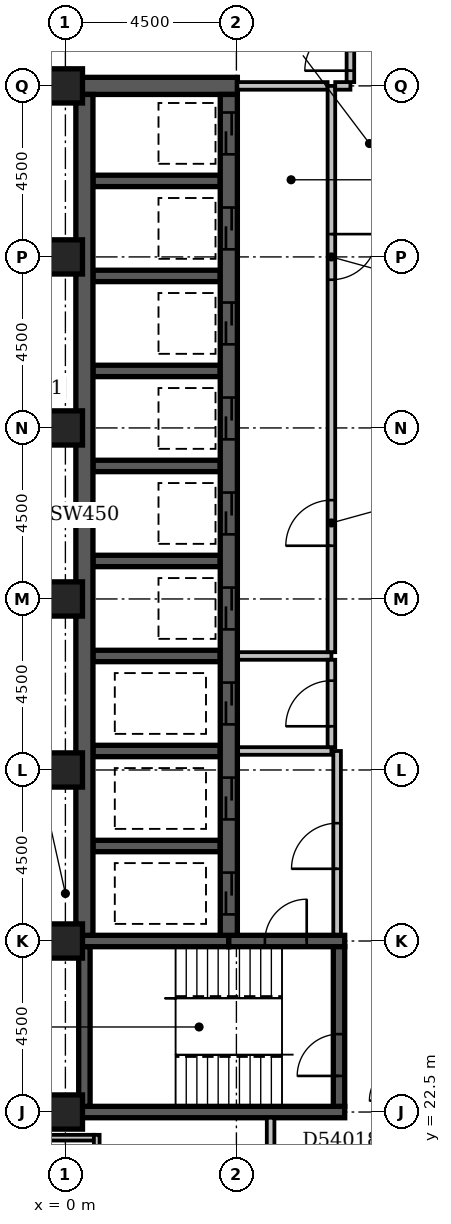
"""IFC4 building model, lengths in metres.
Left out: names, types, materials, properties, quantities, classifications, styles, units other than length and angle.
Written with IfcOpenShell. Run it as: python <this file> out.ifc"""

import sys

from ifc_helpers import new_model, si_unit, direction, frame, frame_2d, origin, origin_2d, place, context, subcontext, project, spatial, rectangle, extrude, element, fill, save


model = new_model("IFC4")
c1 = context("Model", 3, precision=1e-05, world=origin(), true_north=direction((0.0, 1.0)))
c2 = subcontext(c1, "Body", "Model", "MODEL_VIEW")
j1 = project(units=[si_unit("LENGTHUNIT", "METRE"), si_unit("PLANEANGLEUNIT", "RADIAN")], contexts=[c1])
p1 = place(None, origin())
s1 = spatial("IfcSite", under=j1, at=p1, CompositionType="ELEMENT")
p2 = place(p1, origin())
s2 = spatial("IfcBuilding", under=s1, at=p2, CompositionType="ELEMENT")
p3 = place(p2, frame((0.0, 0.0, 211.4)))
s3 = spatial("IfcBuildingStorey", under=s2, at=p3, CompositionType="ELEMENT", Elevation=211.4)
p4 = place(p3, frame((0.275, 49.5, -0.35), z_axis=(0.0, 0.0, 1.0), x_axis=(1.0, 0.0, 0.0)))
e1 = element("IfcWall", 1, at=p4, inside=s3, PredefinedType="SHEAR", context=c2, shape_type="SweptSolid", body=[
    extrude(rectangle(XDim=4.25, YDim=0.45, at=frame_2d((2.125, 0.0))), origin(), (0.0, 0.0, 1.0), 3.65),
])
p5 = place(p3, frame((0.35, 22.5, -0.35), z_axis=(0.0, 0.0, 1.0), x_axis=(1.0, 0.0, 0.0)))
e2 = element("IfcWall", 2, at=p5, inside=s3, PredefinedType="SHEAR", context=c2, shape_type="SweptSolid", body=[
    extrude(rectangle(XDim=7.0, YDim=0.3, at=frame_2d((3.5, 0.0))), origin(), (0.0, 0.0, 1.0), 3.65),
])
p6 = place(p3, frame((0.35, 27.0, -0.35), z_axis=(0.0, 0.0, 1.0), x_axis=(1.0, 0.0, 0.0)))
e3 = element("IfcWall", 3, at=p6, inside=s3, PredefinedType="SHEAR", context=c2, shape_type="SweptSolid", body=[
    extrude(rectangle(XDim=3.95, YDim=0.3, at=frame_2d((1.975, 0.0))), origin(), (0.0, 0.0, 1.0), 3.65),
])
p7 = place(p3, frame((0.5, 22.65, -0.35), z_axis=(0.0, 0.0, 1.0), x_axis=(0.0, 1.0, 0.0)))
e4 = element("IfcWall", 4, at=p7, inside=s3, PredefinedType="SHEAR", context=c2, shape_type="SweptSolid", body=[
    extrude(rectangle(XDim=4.2, YDim=0.3, at=frame_2d((2.1, 0.0))), origin(), (0.0, 0.0, 1.0), 3.65),
])
p8 = place(p3, frame((0.5, 27.15, -0.35), z_axis=(0.0, 0.0, 1.0), x_axis=(0.0, 1.0, 0.0)))
e5 = element("IfcWall", 5, at=p8, inside=s3, PredefinedType="SHEAR", context=c2, shape_type="SweptSolid", body=[
    extrude(rectangle(XDim=22.125, YDim=0.45, at=frame_2d((11.062, 0.0))), origin(), (0.0, 0.0, 1.0), 3.65),
])
for number, where, z_axis, x_axis in (
    (6, (0.725, 29.5, -0.35), (0.0, 0.0, 1.0), (1.0, 0.0, 0.0)),
    (7, (0.725, 32.0, -0.35), (0.0, 0.0, 1.0), (1.0, 0.0, 0.0)),
    (8, (0.725, 34.5, -0.35), (0.0, 0.0, 1.0), (1.0, 0.0, 0.0)),
    (9, (0.725, 37.0, -0.35), (0.0, 0.0, 1.0), (1.0, 0.0, 0.0)),
    (10, (0.725, 39.5, -0.35), (0.0, 0.0, 1.0), (1.0, 0.0, 0.0)),
    (11, (0.725, 42.0, -0.35), (0.0, 0.0, 1.0), (1.0, 0.0, 0.0)),
    (12, (0.725, 44.5, -0.35), (0.0, 0.0, 1.0), (1.0, 0.0, 0.0)),
    (13, (0.725, 47.0, -0.35), (0.0, 0.0, 1.0), (1.0, 0.0, 0.0)),
):
    element("IfcWall", number, at=place(p3, frame(where, z_axis=z_axis, x_axis=x_axis)), inside=s3, PredefinedType="SHEAR", context=c2, shape_type="SweptSolid", body=[
        extrude(rectangle(XDim=3.35, YDim=0.3, at=frame_2d((1.675, 0.0))), origin(), (0.0, 0.0, 1.0), 3.65),
    ])
p9 = place(p3, frame((4.3, 27.0, -0.35), z_axis=(0.0, 0.0, 1.0), x_axis=(1.0, 0.0, 0.0)))
e14 = element("IfcWall", 14, at=p9, inside=s3, PredefinedType="SHEAR", context=c2, shape_type="SweptSolid", body=[
    extrude(rectangle(XDim=3.05, YDim=0.3, at=frame_2d((1.525, 0.0))), origin(), (0.0, 0.0, 1.0), 3.65),
])
p10 = place(p9, frame((0.95, 0.0, 0.35)))
e15 = element("IfcOpeningElement", 15, at=p10, cuts=e14, PredefinedType="OPENING", context=c2, shape_type="SweptSolid", body=[
    extrude(rectangle(XDim=1.1, YDim=2.1, at=frame_2d((0.55, 1.05))), frame((0.0, 0.162, 0.0), z_axis=(0.0, -1.0, 0.0), x_axis=(1.0, 0.0, 0.0)), (0.0, 0.0, 1.0), 0.324),
])
p11 = place(p3, frame((4.3, 27.15, -0.35), z_axis=(0.0, 0.0, 1.0), x_axis=(0.0, 1.0, 0.0)))
e16 = element("IfcWall", 16, at=p11, inside=s3, PredefinedType="SHEAR", context=c2, shape_type="SweptSolid", body=[
    extrude(rectangle(XDim=22.125, YDim=0.45, at=frame_2d((11.062, 0.0))), origin(), (0.0, 0.0, 1.0), 3.65),
])
p12 = place(p11, frame((3.05, 0.0, 0.35)))
e17 = element("IfcOpeningElement", 17, at=p12, cuts=e16, PredefinedType="OPENING", context=c2, shape_type="SweptSolid", body=[
    extrude(rectangle(XDim=1.1, YDim=2.1, at=frame_2d((0.55, 1.05))), frame((0.0, 0.237, 0.0), z_axis=(0.0, -1.0, 0.0), x_axis=(1.0, 0.0, 0.0)), (0.0, 0.0, 1.0), 0.474),
])
p13 = place(p11, frame((0.55, 0.0, 0.35)))
e18 = element("IfcOpeningElement", 18, at=p13, cuts=e16, PredefinedType="OPENING", context=c2, shape_type="SweptSolid", body=[
    extrude(rectangle(XDim=1.1, YDim=2.1, at=frame_2d((0.55, 1.05))), frame((0.0, 0.237, 0.0), z_axis=(0.0, -1.0, 0.0), x_axis=(1.0, 0.0, 0.0)), (0.0, 0.0, 1.0), 0.474),
])
p14 = place(p11, frame((20.55, 0.0, 0.35)))
e19 = element("IfcOpeningElement", 19, at=p14, cuts=e16, PredefinedType="OPENING", context=c2, shape_type="SweptSolid", body=[
    extrude(rectangle(XDim=1.1, YDim=2.1, at=frame_2d((0.55, 1.05))), frame((0.0, 0.237, 0.0), z_axis=(0.0, -1.0, 0.0), x_axis=(1.0, 0.0, 0.0)), (0.0, 0.0, 1.0), 0.474),
])
p15 = place(p11, frame((18.05, 0.0, 0.35)))
e20 = element("IfcOpeningElement", 20, at=p15, cuts=e16, PredefinedType="OPENING", context=c2, shape_type="SweptSolid", body=[
    extrude(rectangle(XDim=1.1, YDim=2.1, at=frame_2d((0.55, 1.05))), frame((0.0, 0.237, 0.0), z_axis=(0.0, -1.0, 0.0), x_axis=(1.0, 0.0, 0.0)), (0.0, 0.0, 1.0), 0.474),
])
p16 = place(p11, frame((15.55, 0.0, 0.35)))
e21 = element("IfcOpeningElement", 21, at=p16, cuts=e16, PredefinedType="OPENING", context=c2, shape_type="SweptSolid", body=[
    extrude(rectangle(XDim=1.1, YDim=2.1, at=frame_2d((0.55, 1.05))), frame((0.0, 0.237, 0.0), z_axis=(0.0, -1.0, 0.0), x_axis=(1.0, 0.0, 0.0)), (0.0, 0.0, 1.0), 0.474),
])
p17 = place(p11, frame((13.05, 0.0, 0.35)))
e22 = element("IfcOpeningElement", 22, at=p17, cuts=e16, PredefinedType="OPENING", context=c2, shape_type="SweptSolid", body=[
    extrude(rectangle(XDim=1.1, YDim=2.1, at=frame_2d((0.55, 1.05))), frame((0.0, 0.237, 0.0), z_axis=(0.0, -1.0, 0.0), x_axis=(1.0, 0.0, 0.0)), (0.0, 0.0, 1.0), 0.474),
])
p18 = place(p11, frame((10.55, 0.0, 0.35)))
e23 = element("IfcOpeningElement", 23, at=p18, cuts=e16, PredefinedType="OPENING", context=c2, shape_type="SweptSolid", body=[
    extrude(rectangle(XDim=1.1, YDim=2.1, at=frame_2d((0.55, 1.05))), frame((0.0, 0.237, 0.0), z_axis=(0.0, -1.0, 0.0), x_axis=(1.0, 0.0, 0.0)), (0.0, 0.0, 1.0), 0.474),
])
p19 = place(p11, frame((8.05, 0.0, 0.35)))
e24 = element("IfcOpeningElement", 24, at=p19, cuts=e16, PredefinedType="OPENING", context=c2, shape_type="SweptSolid", body=[
    extrude(rectangle(XDim=1.1, YDim=2.1, at=frame_2d((0.55, 1.05))), frame((0.0, 0.237, 0.0), z_axis=(0.0, -1.0, 0.0), x_axis=(1.0, 0.0, 0.0)), (0.0, 0.0, 1.0), 0.474),
])
p20 = place(p11, frame((5.55, 0.0, 0.35)))
e25 = element("IfcOpeningElement", 25, at=p20, cuts=e16, PredefinedType="OPENING", context=c2, shape_type="SweptSolid", body=[
    extrude(rectangle(XDim=1.1, YDim=2.1, at=frame_2d((0.55, 1.05))), frame((0.0, 0.237, 0.0), z_axis=(0.0, -1.0, 0.0), x_axis=(1.0, 0.0, 0.0)), (0.0, 0.0, 1.0), 0.474),
])
p21 = place(p3, frame((7.2, 22.65, -0.35), z_axis=(0.0, 0.0, 1.0), x_axis=(0.0, 1.0, 0.0)))
e26 = element("IfcWall", 26, at=p21, inside=s3, PredefinedType="SHEAR", context=c2, shape_type="SweptSolid", body=[
    extrude(rectangle(XDim=4.2, YDim=0.3, at=frame_2d((2.1, 0.0))), origin(), (0.0, 0.0, 1.0), 3.65),
])
p22 = place(p21, frame((0.8, 0.0, 0.35)))
e27 = element("IfcOpeningElement", 27, at=p22, cuts=e26, PredefinedType="OPENING", context=c2, shape_type="SweptSolid", body=[
    extrude(rectangle(XDim=1.1, YDim=2.1, at=frame_2d((0.55, 1.05))), frame((0.0, 0.162, 0.0), z_axis=(0.0, -1.0, 0.0), x_axis=(1.0, 0.0, 0.0)), (0.0, 0.0, 1.0), 0.324),
])
for number, where, z_axis, x_axis in (
    (28, (0.0, 22.5, -0.35), (0.0, 0.0, 1.0), (1.0, 0.0, 0.0)),
    (29, (0.0, 27.0, -0.35), (0.0, 0.0, 1.0), (1.0, 0.0, 0.0)),
    (30, (0.0, 31.5, -0.35), (0.0, 0.0, 1.0), (1.0, 0.0, 0.0)),
    (31, (0.0, 36.0, -0.35), (0.0, 0.0, 1.0), (1.0, 0.0, 0.0)),
    (32, (0.0, 40.5, -0.35), (0.0, 0.0, 1.0), (1.0, 0.0, 0.0)),
    (33, (0.0, 45.0, -0.35), (0.0, 0.0, 1.0), (1.0, 0.0, 0.0)),
    (34, (0.0, 49.5, -0.35), (0.0, 0.0, 1.0), (1.0, 0.0, 0.0)),
):
    element("IfcColumn", number, at=place(p3, frame(where, z_axis=z_axis, x_axis=x_axis)), inside=s3, PredefinedType="COLUMN", context=c2, shape_type="SweptSolid", body=[
        extrude(rectangle(XDim=0.9, YDim=0.9, at=origin_2d()), origin(), (0.0, 0.0, 1.0), 3.65),
    ])
p23 = place(p3, frame((-0.6, 21.825, 0.0), z_axis=(0.0, 0.0, 1.0), x_axis=(1.0, 0.0, 0.0)))
e35 = element("IfcWall", 35, at=p23, inside=s3, PredefinedType="STANDARD", context=c2, shape_type="SweptSolid", body=[
    extrude(rectangle(XDim=1.35, YDim=0.15, at=frame_2d((0.675, 0.0))), origin(), (0.0, 0.0, 1.0), 2.7),
])
p24 = place(p3, frame((0.825, 21.9, 0.0), z_axis=(0.0, 0.0, 1.0), x_axis=(0.0, -1.0, 0.0)))
e36 = element("IfcWall", 36, at=p24, inside=s3, PredefinedType="STANDARD", context=c2, shape_type="SweptSolid", body=[
    extrude(rectangle(XDim=1.65, YDim=0.15, at=frame_2d((0.825, 0.0))), origin(), (0.0, 0.0, 1.0), 2.7),
])
p25 = place(p3, frame((4.545, 34.5, 0.0), z_axis=(0.0, 0.0, 1.0), x_axis=(1.0, 0.0, 0.0)))
e37 = element("IfcWall", 37, at=p25, inside=s3, PredefinedType="PARTITIONING", context=c2, shape_type="SweptSolid", body=[
    extrude(rectangle(XDim=2.455, YDim=0.2, at=frame_2d((1.228, 0.0))), origin(), (0.0, 0.0, 1.0), 3.3),
])
p26 = place(p3, frame((7.0, 34.6, 0.0), z_axis=(0.0, 0.0, 1.0), x_axis=(0.0, 1.0, 0.0)))
e38 = element("IfcWall", 38, at=p26, inside=s3, PredefinedType="PARTITIONING", context=c2, shape_type="SweptSolid", body=[
    extrude(rectangle(XDim=14.9, YDim=0.2, at=frame_2d((7.45, 0.0))), origin(), (0.0, 0.0, 1.0), 3.3),
])
p27 = place(p26, frame((2.8, 0.0, 0.0)))
e39 = element("IfcOpeningElement", 39, at=p27, cuts=e38, PredefinedType="OPENING", context=c2, shape_type="SweptSolid", body=[
    extrude(rectangle(XDim=1.2, YDim=2.1, at=frame_2d((0.6, 1.05))), frame((0.0, 0.112, 0.0), z_axis=(0.0, -1.0, 0.0), x_axis=(1.0, 0.0, 0.0)), (0.0, 0.0, 1.0), 0.224),
])
p28 = place(p26, frame((9.8, 0.0, 0.0)))
e40 = element("IfcOpeningElement", 40, at=p28, cuts=e38, PredefinedType="OPENING", context=c2, shape_type="SweptSolid", body=[
    extrude(rectangle(XDim=1.2, YDim=2.1, at=frame_2d((0.6, 1.05))), frame((0.0, 0.112, 0.0), z_axis=(0.0, -1.0, 0.0), x_axis=(1.0, 0.0, 0.0)), (0.0, 0.0, 1.0), 0.224),
])
p29 = place(p3, frame((4.525, 49.5, 0.0), z_axis=(0.0, 0.0, 1.0), x_axis=(1.0, 0.0, 0.0)))
e41 = element("IfcWall", 41, at=p29, inside=s3, PredefinedType="PARTITIONING", context=c2, shape_type="SweptSolid", body=[
    extrude(rectangle(XDim=2.375, YDim=0.2, at=frame_2d((1.188, 0.0))), origin(), (0.0, 0.0, 1.0), 3.3),
])
p30 = place(p3, frame((4.545, 32.0, 0.0), z_axis=(0.0, 0.0, 1.0), x_axis=(1.0, 0.0, 0.0)))
e42 = element("IfcWall", 42, at=p30, inside=s3, PredefinedType="PARTITIONING", context=c2, shape_type="SweptSolid", body=[
    extrude(rectangle(XDim=2.455, YDim=0.2, at=frame_2d((1.228, 0.0))), origin(), (0.0, 0.0, 1.0), 3.3),
])
p31 = place(p3, frame((7.0, 32.1, 0.0), z_axis=(0.0, 0.0, 1.0), x_axis=(0.0, 1.0, 0.0)))
e43 = element("IfcWall", 43, at=p31, inside=s3, PredefinedType="PARTITIONING", context=c2, shape_type="SweptSolid", body=[
    extrude(rectangle(XDim=2.3, YDim=0.2, at=frame_2d((1.15, 0.0))), origin(), (0.0, 0.0, 1.0), 3.3),
])
p32 = place(p31, frame((0.55, 0.0, 0.0)))
e44 = element("IfcOpeningElement", 44, at=p32, cuts=e43, PredefinedType="OPENING", context=c2, shape_type="SweptSolid", body=[
    extrude(rectangle(XDim=1.2, YDim=2.1, at=frame_2d((0.6, 1.05))), frame((0.0, 0.112, 0.0), z_axis=(0.0, -1.0, 0.0), x_axis=(1.0, 0.0, 0.0)), (0.0, 0.0, 1.0), 0.224),
])
p33 = place(p3, frame((7.15, 27.17, 0.0), z_axis=(0.0, 0.0, 1.0), x_axis=(0.0, 1.0, 0.0)))
e45 = element("IfcWall", 45, at=p33, inside=s3, PredefinedType="PARTITIONING", context=c2, shape_type="SweptSolid", body=[
    extrude(rectangle(XDim=4.83, YDim=0.2, at=frame_2d((2.415, 0.0))), origin(), (0.0, 0.0, 1.0), 3.3),
])
p34 = place(p33, frame((1.73, 0.0, 0.0)))
e46 = element("IfcOpeningElement", 46, at=p34, cuts=e45, PredefinedType="OPENING", context=c2, shape_type="SweptSolid", body=[
    extrude(rectangle(XDim=1.2, YDim=2.1, at=frame_2d((0.6, 1.05))), frame((0.0, 0.112, 0.0), z_axis=(0.0, -1.0, 0.0), x_axis=(1.0, 0.0, 0.0)), (0.0, 0.0, 1.0), 0.224),
])
p35 = place(p3, frame((7.1, 49.5, 0.0), z_axis=(0.0, 0.0, 1.0), x_axis=(1.0, 0.0, 0.0)))
e47 = element("IfcWall", 47, at=p35, inside=s3, PredefinedType="PARTITIONING", context=c2, shape_type="SweptSolid", body=[
    extrude(rectangle(XDim=0.4, YDim=0.2, at=frame_2d((0.2, 0.0))), origin(), (0.0, 0.0, 1.0), 3.3),
])
p36 = place(p3, frame((7.5, 49.6, 0.0), z_axis=(0.0, 0.0, 1.0), x_axis=(0.0, 1.0, 0.0)))
e48 = element("IfcWall", 48, at=p36, inside=s3, PredefinedType="PARTITIONING", context=c2, shape_type="SweptSolid", body=[
    extrude(rectangle(XDim=3.9, YDim=0.2, at=frame_2d((1.95, 0.0))), origin(), (0.0, 0.0, 1.0), 3.3),
])
p37 = place(p36, frame((0.3, 0.0, 0.0)))
e49 = element("IfcOpeningElement", 49, at=p37, cuts=e48, PredefinedType="OPENING", context=c2, shape_type="SweptSolid", body=[
    extrude(rectangle(XDim=1.2, YDim=2.1, at=frame_2d((0.6, 1.05))), frame((0.0, 0.112, 0.0), z_axis=(0.0, -1.0, 0.0), x_axis=(1.0, 0.0, 0.0)), (0.0, 0.0, 1.0), 0.224),
])
p38 = place(p3, frame((5.4, 17.4, 0.0), z_axis=(0.0, 0.0, 1.0), x_axis=(0.0, 1.0, 0.0)))
e50 = element("IfcWall", 50, at=p38, inside=s3, PredefinedType="PARTITIONING", context=c2, shape_type="SweptSolid", body=[
    extrude(rectangle(XDim=4.95, YDim=0.2, at=frame_2d((2.475, 0.0))), origin(), (0.0, 0.0, 1.0), 3.3),
])
p39 = place(p38, frame((2.55, 0.0, 0.0)))
e51 = element("IfcOpeningElement", 51, at=p39, cuts=e50, PredefinedType="OPENING", context=c2, shape_type="SweptSolid", body=[
    extrude(rectangle(XDim=1.0, YDim=2.1, at=frame_2d((0.5, 1.05))), frame((0.0, 0.112, 0.0), z_axis=(0.0, -1.0, 0.0), x_axis=(1.0, 0.0, 0.0)), (0.0, 0.0, 1.0), 0.224),
])
p40 = place(p37, origin())
e52 = element("IfcDoor", 52, at=p40, inside=s3, OperationType="SINGLE_SWING_LEFT", PredefinedType="DOOR", context=c2, shape_type="SweptSolid", body=[
    extrude(rectangle(XDim=1.2, YDim=2.1, at=frame_2d((0.6, 1.05))), frame((0.0, 0.025, 0.0), z_axis=(0.0, -1.0, 0.0), x_axis=(1.0, 0.0, 0.0)), (0.0, 0.0, 1.0), 0.05),
])
fill(e49, e52)
p41 = place(p34, origin())
e53 = element("IfcDoor", 53, at=p41, inside=s3, OperationType="SINGLE_SWING_LEFT", PredefinedType="DOOR", context=c2, shape_type="SweptSolid", body=[
    extrude(rectangle(XDim=1.2, YDim=2.1, at=frame_2d((0.6, 1.05))), frame((0.0, 0.025, 0.0), z_axis=(0.0, -1.0, 0.0), x_axis=(1.0, 0.0, 0.0)), (0.0, 0.0, 1.0), 0.05),
])
fill(e46, e53)
p42 = place(p12, origin())
e54 = element("IfcDoor", 54, at=p42, inside=s3, OperationType="SLIDING_TO_LEFT", PredefinedType="DOOR", context=c2, shape_type="SweptSolid", body=[
    extrude(rectangle(XDim=1.1, YDim=2.1, at=frame_2d((0.55, 1.05))), frame((0.0, 0.025, 0.0), z_axis=(0.0, -1.0, 0.0), x_axis=(1.0, 0.0, 0.0)), (0.0, 0.0, 1.0), 0.05),
])
fill(e17, e54)
p43 = place(p13, origin())
e55 = element("IfcDoor", 55, at=p43, inside=s3, OperationType="SLIDING_TO_LEFT", PredefinedType="DOOR", context=c2, shape_type="SweptSolid", body=[
    extrude(rectangle(XDim=1.1, YDim=2.1, at=frame_2d((0.55, 1.05))), frame((0.0, 0.025, 0.0), z_axis=(0.0, -1.0, 0.0), x_axis=(1.0, 0.0, 0.0)), (0.0, 0.0, 1.0), 0.05),
])
fill(e18, e55)
p44 = place(p14, origin())
e56 = element("IfcDoor", 56, at=p44, inside=s3, OperationType="SLIDING_TO_LEFT", PredefinedType="DOOR", context=c2, shape_type="SweptSolid", body=[
    extrude(rectangle(XDim=1.1, YDim=2.1, at=frame_2d((0.55, 1.05))), frame((0.0, 0.025, 0.0), z_axis=(0.0, -1.0, 0.0), x_axis=(1.0, 0.0, 0.0)), (0.0, 0.0, 1.0), 0.05),
])
fill(e19, e56)
p45 = place(p15, origin())
e57 = element("IfcDoor", 57, at=p45, inside=s3, OperationType="SLIDING_TO_LEFT", PredefinedType="DOOR", context=c2, shape_type="SweptSolid", body=[
    extrude(rectangle(XDim=1.1, YDim=2.1, at=frame_2d((0.55, 1.05))), frame((0.0, 0.025, 0.0), z_axis=(0.0, -1.0, 0.0), x_axis=(1.0, 0.0, 0.0)), (0.0, 0.0, 1.0), 0.05),
])
fill(e20, e57)
p46 = place(p16, origin())
e58 = element("IfcDoor", 58, at=p46, inside=s3, OperationType="SLIDING_TO_LEFT", PredefinedType="DOOR", context=c2, shape_type="SweptSolid", body=[
    extrude(rectangle(XDim=1.1, YDim=2.1, at=frame_2d((0.55, 1.05))), frame((0.0, 0.025, 0.0), z_axis=(0.0, -1.0, 0.0), x_axis=(1.0, 0.0, 0.0)), (0.0, 0.0, 1.0), 0.05),
])
fill(e21, e58)
p47 = place(p17, origin())
e59 = element("IfcDoor", 59, at=p47, inside=s3, OperationType="SLIDING_TO_LEFT", PredefinedType="DOOR", context=c2, shape_type="SweptSolid", body=[
    extrude(rectangle(XDim=1.1, YDim=2.1, at=frame_2d((0.55, 1.05))), frame((0.0, 0.025, 0.0), z_axis=(0.0, -1.0, 0.0), x_axis=(1.0, 0.0, 0.0)), (0.0, 0.0, 1.0), 0.05),
])
fill(e22, e59)
p48 = place(p18, origin())
e60 = element("IfcDoor", 60, at=p48, inside=s3, OperationType="SLIDING_TO_LEFT", PredefinedType="DOOR", context=c2, shape_type="SweptSolid", body=[
    extrude(rectangle(XDim=1.1, YDim=2.1, at=frame_2d((0.55, 1.05))), frame((0.0, 0.025, 0.0), z_axis=(0.0, -1.0, 0.0), x_axis=(1.0, 0.0, 0.0)), (0.0, 0.0, 1.0), 0.05),
])
fill(e23, e60)
p49 = place(p19, origin())
e61 = element("IfcDoor", 61, at=p49, inside=s3, OperationType="SLIDING_TO_LEFT", PredefinedType="DOOR", context=c2, shape_type="SweptSolid", body=[
    extrude(rectangle(XDim=1.1, YDim=2.1, at=frame_2d((0.55, 1.05))), frame((0.0, 0.025, 0.0), z_axis=(0.0, -1.0, 0.0), x_axis=(1.0, 0.0, 0.0)), (0.0, 0.0, 1.0), 0.05),
])
fill(e24, e61)
p50 = place(p27, origin())
e62 = element("IfcDoor", 62, at=p50, inside=s3, OperationType="SINGLE_SWING_LEFT", PredefinedType="DOOR", context=c2, shape_type="SweptSolid", body=[
    extrude(rectangle(XDim=1.2, YDim=2.1, at=frame_2d((0.6, 1.05))), frame((0.0, 0.025, 0.0), z_axis=(0.0, -1.0, 0.0), x_axis=(1.0, 0.0, 0.0)), (0.0, 0.0, 1.0), 0.05),
])
fill(e39, e62)
p51 = place(p28, origin())
e63 = element("IfcDoor", 63, at=p51, inside=s3, OperationType="SINGLE_SWING_RIGHT", PredefinedType="DOOR", context=c2, shape_type="SweptSolid", body=[
    extrude(rectangle(XDim=1.2, YDim=2.1, at=frame_2d((0.6, 1.05))), frame((0.0, 0.025, 0.0), z_axis=(0.0, -1.0, 0.0), x_axis=(1.0, 0.0, 0.0)), (0.0, 0.0, 1.0), 0.05),
])
fill(e40, e63)
p52 = place(p32, origin())
e64 = element("IfcDoor", 64, at=p52, inside=s3, OperationType="SINGLE_SWING_LEFT", PredefinedType="DOOR", context=c2, shape_type="SweptSolid", body=[
    extrude(rectangle(XDim=1.2, YDim=2.1, at=frame_2d((0.6, 1.05))), frame((0.0, 0.025, 0.0), z_axis=(0.0, -1.0, 0.0), x_axis=(1.0, 0.0, 0.0)), (0.0, 0.0, 1.0), 0.05),
])
fill(e44, e64)
p53 = place(p20, origin())
e65 = element("IfcDoor", 65, at=p53, inside=s3, OperationType="SLIDING_TO_LEFT", PredefinedType="DOOR", context=c2, shape_type="SweptSolid", body=[
    extrude(rectangle(XDim=1.1, YDim=2.1, at=frame_2d((0.55, 1.05))), frame((0.0, 0.025, 0.0), z_axis=(0.0, -1.0, 0.0), x_axis=(1.0, 0.0, 0.0)), (0.0, 0.0, 1.0), 0.05),
])
fill(e25, e65)
p54 = place(p10, frame((1.1, 0.0, 0.0), z_axis=(0.0, 0.0, 1.0), x_axis=(-1.0, 0.0, 0.0)))
e66 = element("IfcDoor", 66, at=p54, inside=s3, OperationType="SINGLE_SWING_LEFT", PredefinedType="DOOR", context=c2, shape_type="SweptSolid", body=[
    extrude(rectangle(XDim=1.1, YDim=2.1, at=frame_2d((0.55, 1.05))), frame((0.0, 0.025, 0.0), z_axis=(0.0, -1.0, 0.0), x_axis=(1.0, 0.0, 0.0)), (0.0, 0.0, 1.0), 0.05),
])
fill(e15, e66)
p55 = place(p22, origin())
e67 = element("IfcDoor", 67, at=p55, inside=s3, OperationType="SINGLE_SWING_LEFT", PredefinedType="DOOR", context=c2, shape_type="SweptSolid", body=[
    extrude(rectangle(XDim=1.1, YDim=2.1, at=frame_2d((0.55, 1.05))), frame((0.0, 0.025, 0.0), z_axis=(0.0, -1.0, 0.0), x_axis=(1.0, 0.0, 0.0)), (0.0, 0.0, 1.0), 0.05),
])
fill(e27, e67)
save(model, sys.argv[1])
